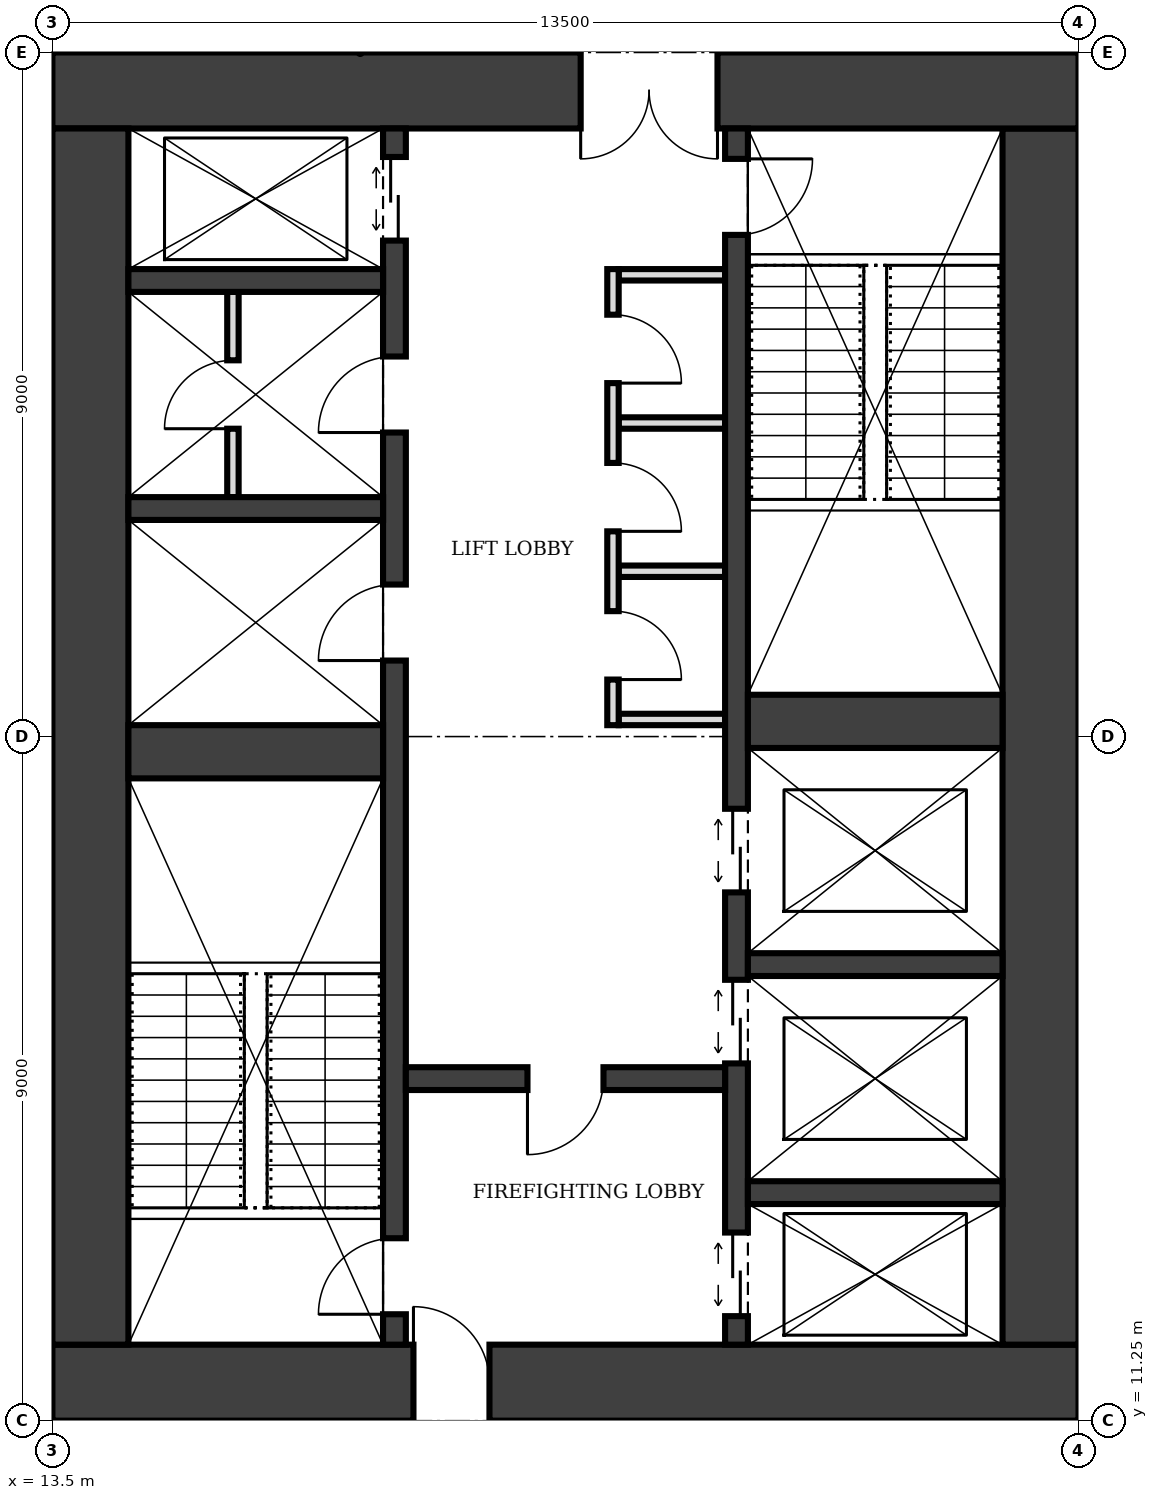
"""IFC4 building model, lengths in metres.
Left out: names, types, materials, properties, quantities, classifications, styles, units other than length and angle.
Written with IfcOpenShell. Run it as: python <this file> out.ifc"""

import sys

from ifc_helpers import new_model, si_unit, direction, frame, frame_2d, origin, place, context, subcontext, project, spatial, rectangle, extrude, element, fill, save


model = new_model("IFC4")
c1 = context("Model", 3, precision=1e-05, world=origin(), true_north=direction((0.0, 1.0)))
c2 = subcontext(c1, "Body", "Model", "MODEL_VIEW")
j1 = project(units=[si_unit("LENGTHUNIT", "METRE"), si_unit("PLANEANGLEUNIT", "RADIAN")], contexts=[c1])
p1 = place(None, origin())
s1 = spatial("IfcSite", under=j1, at=p1, CompositionType="ELEMENT")
p2 = place(p1, origin())
s2 = spatial("IfcBuilding", under=s1, at=p2, CompositionType="ELEMENT")
p3 = place(p2, frame((0.0, 0.0, 293.0)))
s3 = spatial("IfcBuildingStorey", under=s2, at=p3, CompositionType="ELEMENT", Elevation=293.0)
p4 = place(p3, frame((13.5, 11.75, 0.0), z_axis=(0.0, 0.0, 1.0), x_axis=(1.0, 0.0, 0.0)))
e1 = element("IfcWall", 1, at=p4, inside=s3, PredefinedType="SHEAR", context=c2, shape_type="SweptSolid", body=[
    extrude(rectangle(XDim=13.5, YDim=1.0, at=frame_2d((6.75, 0.0))), origin(), (0.0, 0.0, 1.0), 4.0),
])
p5 = place(p4, frame((4.75, 0.0, 0.0)))
e2 = element("IfcOpeningElement", 2, at=p5, cuts=e1, PredefinedType="OPENING", context=c2, shape_type="SweptSolid", body=[
    extrude(rectangle(XDim=1.0, YDim=2.1, at=frame_2d((0.5, 1.05))), frame((0.0, 0.51, 0.0), z_axis=(0.0, -1.0, 0.0), x_axis=(1.0, 0.0, 0.0)), (0.0, 0.0, 1.0), 1.02),
])
p6 = place(p3, frame((26.5, 12.25, 0.0), z_axis=(0.0, 0.0, 1.0), x_axis=(0.0, 1.0, 0.0)))
e3 = element("IfcWall", 3, at=p6, inside=s3, PredefinedType="SHEAR", context=c2, shape_type="SweptSolid", body=[
    extrude(rectangle(XDim=16.0, YDim=1.0, at=frame_2d((8.0, 0.0))), origin(), (0.0, 0.0, 1.0), 4.0),
])
p7 = place(p3, frame((27.0, 28.75, 0.0), z_axis=(0.0, 0.0, 1.0), x_axis=(-1.0, 0.0, 0.0)))
e4 = element("IfcWall", 4, at=p7, inside=s3, PredefinedType="SHEAR", context=c2, shape_type="SweptSolid", body=[
    extrude(rectangle(XDim=13.5, YDim=1.0, at=frame_2d((6.75, 0.0))), origin(), (0.0, 0.0, 1.0), 4.0),
])
p8 = place(p7, frame((4.75, 0.0, 0.0)))
e5 = element("IfcOpeningElement", 5, at=p8, cuts=e4, PredefinedType="OPENING", context=c2, shape_type="SweptSolid", body=[
    extrude(rectangle(XDim=1.8, YDim=2.1, at=frame_2d((0.9, 1.05))), frame((0.0, 0.51, 0.0), z_axis=(0.0, -1.0, 0.0), x_axis=(1.0, 0.0, 0.0)), (0.0, 0.0, 1.0), 1.02),
])
p9 = place(p3, frame((14.0, 28.25, 0.0), z_axis=(0.0, 0.0, 1.0), x_axis=(0.0, -1.0, 0.0)))
e6 = element("IfcWall", 6, at=p9, inside=s3, PredefinedType="SHEAR", context=c2, shape_type="SweptSolid", body=[
    extrude(rectangle(XDim=16.0, YDim=1.0, at=frame_2d((8.0, 0.0))), origin(), (0.0, 0.0, 1.0), 4.0),
])
p10 = place(p3, frame((18.0, 12.25, 0.0), z_axis=(0.0, 0.0, 1.0), x_axis=(0.0, 1.0, 0.0)))
e7 = element("IfcWall", 7, at=p10, inside=s3, PredefinedType="SHEAR", context=c2, shape_type="SweptSolid", body=[
    extrude(rectangle(XDim=16.0, YDim=0.3, at=frame_2d((8.0, 0.0))), origin(), (0.0, 0.0, 1.0), 4.0),
])
p11 = place(p10, frame((0.4, 0.0, 0.0)))
e8 = element("IfcOpeningElement", 8, at=p11, cuts=e7, PredefinedType="OPENING", context=c2, shape_type="SweptSolid", body=[
    extrude(rectangle(XDim=1.0, YDim=2.1, at=frame_2d((0.5, 1.05))), frame((0.0, 0.16, 0.0), z_axis=(0.0, -1.0, 0.0), x_axis=(1.0, 0.0, 0.0)), (0.0, 0.0, 1.0), 0.32),
])
p12 = place(p10, frame((14.525, 0.0, 0.0)))
e9 = element("IfcOpeningElement", 9, at=p12, cuts=e7, PredefinedType="OPENING", context=c2, shape_type="SweptSolid", body=[
    extrude(rectangle(XDim=1.1, YDim=2.1, at=frame_2d((0.55, 1.05))), frame((0.0, 0.16, 0.0), z_axis=(0.0, -1.0, 0.0), x_axis=(1.0, 0.0, 0.0)), (0.0, 0.0, 1.0), 0.32),
])
p13 = place(p10, frame((9.0, 0.0, 0.0)))
e10 = element("IfcOpeningElement", 10, at=p13, cuts=e7, PredefinedType="OPENING", context=c2, shape_type="SweptSolid", body=[
    extrude(rectangle(XDim=1.0, YDim=2.1, at=frame_2d((0.5, 1.05))), frame((0.0, 0.16, 0.0), z_axis=(0.0, -1.0, 0.0), x_axis=(1.0, 0.0, 0.0)), (0.0, 0.0, 1.0), 0.32),
])
p14 = place(p10, frame((12.0, 0.0, 0.0)))
e11 = element("IfcOpeningElement", 11, at=p14, cuts=e7, PredefinedType="OPENING", context=c2, shape_type="SweptSolid", body=[
    extrude(rectangle(XDim=1.0, YDim=2.1, at=frame_2d((0.5, 1.05))), frame((0.0, 0.16, 0.0), z_axis=(0.0, -1.0, 0.0), x_axis=(1.0, 0.0, 0.0)), (0.0, 0.0, 1.0), 0.32),
])
p15 = place(p3, frame((22.5, 12.25, 0.0), z_axis=(0.0, 0.0, 1.0), x_axis=(0.0, 1.0, 0.0)))
e12 = element("IfcWall", 12, at=p15, inside=s3, PredefinedType="SHEAR", context=c2, shape_type="SweptSolid", body=[
    extrude(rectangle(XDim=16.0, YDim=0.3, at=frame_2d((8.0, 0.0))), origin(), (0.0, 0.0, 1.0), 4.0),
])
p16 = place(p15, frame((14.6, 0.0, 0.0)))
e13 = element("IfcOpeningElement", 13, at=p16, cuts=e12, PredefinedType="OPENING", context=c2, shape_type="SweptSolid", body=[
    extrude(rectangle(XDim=1.0, YDim=2.1, at=frame_2d((0.5, 1.05))), frame((0.0, 0.16, 0.0), z_axis=(0.0, -1.0, 0.0), x_axis=(1.0, 0.0, 0.0)), (0.0, 0.0, 1.0), 0.32),
])
p17 = place(p15, frame((0.375, 0.0, 0.0)))
e14 = element("IfcOpeningElement", 14, at=p17, cuts=e12, PredefinedType="OPENING", context=c2, shape_type="SweptSolid", body=[
    extrude(rectangle(XDim=1.1, YDim=2.1, at=frame_2d((0.55, 1.05))), frame((0.0, 0.16, 0.0), z_axis=(0.0, -1.0, 0.0), x_axis=(1.0, 0.0, 0.0)), (0.0, 0.0, 1.0), 0.32),
])
p18 = place(p15, frame((3.7, 0.0, 0.0)))
e15 = element("IfcOpeningElement", 15, at=p18, cuts=e12, PredefinedType="OPENING", context=c2, shape_type="SweptSolid", body=[
    extrude(rectangle(XDim=1.1, YDim=2.1, at=frame_2d((0.55, 1.05))), frame((0.0, 0.16, 0.0), z_axis=(0.0, -1.0, 0.0), x_axis=(1.0, 0.0, 0.0)), (0.0, 0.0, 1.0), 0.32),
])
p19 = place(p15, frame((5.95, 0.0, 0.0)))
e16 = element("IfcOpeningElement", 16, at=p19, cuts=e12, PredefinedType="OPENING", context=c2, shape_type="SweptSolid", body=[
    extrude(rectangle(XDim=1.1, YDim=2.1, at=frame_2d((0.55, 1.05))), frame((0.0, 0.16, 0.0), z_axis=(0.0, -1.0, 0.0), x_axis=(1.0, 0.0, 0.0)), (0.0, 0.0, 1.0), 0.32),
])
p20 = place(p3, frame((14.5, 20.05, 0.0), z_axis=(0.0, 0.0, 1.0), x_axis=(1.0, 0.0, 0.0)))
e17 = element("IfcWall", 17, at=p20, inside=s3, PredefinedType="SHEAR", context=c2, shape_type="SweptSolid", body=[
    extrude(rectangle(XDim=3.35, YDim=0.7, at=frame_2d((1.675, 0.0))), origin(), (0.0, 0.0, 1.0), 4.0),
])
p21 = place(p3, frame((18.15, 15.75, 0.0), z_axis=(0.0, 0.0, 1.0), x_axis=(1.0, 0.0, 0.0)))
e18 = element("IfcWall", 18, at=p21, inside=s3, PredefinedType="SHEAR", context=c2, shape_type="SweptSolid", body=[
    extrude(rectangle(XDim=4.2, YDim=0.3, at=frame_2d((2.1, 0.0))), origin(), (0.0, 0.0, 1.0), 4.0),
])
p22 = place(p21, frame((1.6, 0.0, 0.0)))
e19 = element("IfcOpeningElement", 19, at=p22, cuts=e18, PredefinedType="OPENING", context=c2, shape_type="SweptSolid", body=[
    extrude(rectangle(XDim=1.0, YDim=2.1, at=frame_2d((0.5, 1.05))), frame((0.0, 0.16, 0.0), z_axis=(0.0, -1.0, 0.0), x_axis=(1.0, 0.0, 0.0)), (0.0, 0.0, 1.0), 0.32),
])
for number, where, z_axis, x_axis in (
    (20, (22.65, 14.25, 0.0), (0.0, 0.0, 1.0), (1.0, 0.0, 0.0)),
    (21, (22.65, 17.25, 0.0), (0.0, 0.0, 1.0), (1.0, 0.0, 0.0)),
):
    element("IfcWall", number, at=place(p3, frame(where, z_axis=z_axis, x_axis=x_axis)), inside=s3, PredefinedType="SHEAR", context=c2, shape_type="SweptSolid", body=[
        extrude(rectangle(XDim=3.35, YDim=0.3, at=frame_2d((1.675, 0.0))), origin(), (0.0, 0.0, 1.0), 4.0),
    ])
p23 = place(p3, frame((22.65, 20.45, 0.0), z_axis=(0.0, 0.0, 1.0), x_axis=(1.0, 0.0, 0.0)))
e22 = element("IfcWall", 22, at=p23, inside=s3, PredefinedType="SHEAR", context=c2, shape_type="SweptSolid", body=[
    extrude(rectangle(XDim=3.35, YDim=0.7, at=frame_2d((1.675, 0.0))), origin(), (0.0, 0.0, 1.0), 4.0),
])
for number, where, z_axis, x_axis in (
    (23, (14.5, 23.25, 0.0), (0.0, 0.0, 1.0), (1.0, 0.0, 0.0)),
    (24, (14.5, 26.25, 0.0), (0.0, 0.0, 1.0), (1.0, 0.0, 0.0)),
):
    element("IfcWall", number, at=place(p3, frame(where, z_axis=z_axis, x_axis=x_axis)), inside=s3, PredefinedType="SHEAR", context=c2, shape_type="SweptSolid", body=[
        extrude(rectangle(XDim=3.35, YDim=0.3, at=frame_2d((1.675, 0.0))), origin(), (0.0, 0.0, 1.0), 4.0),
    ])
p24 = place(p3, frame((20.875, 20.4, 0.0), z_axis=(0.0, 0.0, 1.0), x_axis=(0.0, 1.0, 0.0)))
e25 = element("IfcWall", 25, at=p24, inside=s3, PredefinedType="PARTITIONING", context=c2, shape_type="SweptSolid", body=[
    extrude(rectangle(XDim=6.0, YDim=0.15, at=frame_2d((3.0, 0.0))), origin(), (0.0, 0.0, 1.0), 3.75),
])
p25 = place(p24, frame((0.6, 0.0, 0.0)))
e26 = element("IfcOpeningElement", 26, at=p25, cuts=e25, PredefinedType="OPENING", context=c2, shape_type="SweptSolid", body=[
    extrude(rectangle(XDim=0.9, YDim=2.1, at=frame_2d((0.45, 1.05))), frame((0.0, 0.085, 0.0), z_axis=(0.0, -1.0, 0.0), x_axis=(1.0, 0.0, 0.0)), (0.0, 0.0, 1.0), 0.17),
])
p26 = place(p24, frame((2.55, 0.0, 0.0)))
e27 = element("IfcOpeningElement", 27, at=p26, cuts=e25, PredefinedType="OPENING", context=c2, shape_type="SweptSolid", body=[
    extrude(rectangle(XDim=0.9, YDim=2.1, at=frame_2d((0.45, 1.05))), frame((0.0, 0.085, 0.0), z_axis=(0.0, -1.0, 0.0), x_axis=(1.0, 0.0, 0.0)), (0.0, 0.0, 1.0), 0.17),
])
p27 = place(p24, frame((4.5, 0.0, 0.0)))
e28 = element("IfcOpeningElement", 28, at=p27, cuts=e25, PredefinedType="OPENING", context=c2, shape_type="SweptSolid", body=[
    extrude(rectangle(XDim=0.9, YDim=2.1, at=frame_2d((0.45, 1.05))), frame((0.0, 0.085, 0.0), z_axis=(0.0, -1.0, 0.0), x_axis=(1.0, 0.0, 0.0)), (0.0, 0.0, 1.0), 0.17),
])
for number, where, z_axis, x_axis in (
    (29, (20.95, 20.475, 0.0), (0.0, 0.0, 1.0), (1.0, 0.0, 0.0)),
    (30, (20.95, 22.425, 0.0), (0.0, 0.0, 1.0), (1.0, 0.0, 0.0)),
    (31, (20.95, 24.375, 0.0), (0.0, 0.0, 1.0), (1.0, 0.0, 0.0)),
    (32, (20.95, 26.325, 0.0), (0.0, 0.0, 1.0), (1.0, 0.0, 0.0)),
):
    element("IfcWall", number, at=place(p3, frame(where, z_axis=z_axis, x_axis=x_axis)), inside=s3, PredefinedType="PARTITIONING", context=c2, shape_type="SweptSolid", body=[
        extrude(rectangle(XDim=1.4, YDim=0.15, at=frame_2d((0.7, 0.0))), origin(), (0.0, 0.0, 1.0), 3.75),
    ])
p28 = place(p3, frame((15.875, 23.4, 0.0), z_axis=(0.0, 0.0, 1.0), x_axis=(0.0, 1.0, 0.0)))
e33 = element("IfcWall", 33, at=p28, inside=s3, PredefinedType="PARTITIONING", context=c2, shape_type="SweptSolid", body=[
    extrude(rectangle(XDim=2.7, YDim=0.15, at=frame_2d((1.35, 0.0))), origin(), (0.0, 0.0, 1.0), 3.75),
])
p29 = place(p28, frame((0.9, 0.0, 0.0)))
e34 = element("IfcOpeningElement", 34, at=p29, cuts=e33, PredefinedType="OPENING", context=c2, shape_type="SweptSolid", body=[
    extrude(rectangle(XDim=0.9, YDim=2.1, at=frame_2d((0.45, 1.05))), frame((0.0, 0.085, 0.0), z_axis=(0.0, -1.0, 0.0), x_axis=(1.0, 0.0, 0.0)), (0.0, 0.0, 1.0), 0.17),
])
p30 = place(p5, origin())
e35 = element("IfcDoor", 35, at=p30, inside=s3, OperationType="SINGLE_SWING_LEFT", PredefinedType="DOOR", context=c2, shape_type="SweptSolid", body=[
    extrude(rectangle(XDim=1.0, YDim=2.1, at=frame_2d((0.5, 1.05))), frame((0.0, 0.025, 0.0), z_axis=(0.0, -1.0, 0.0), x_axis=(1.0, 0.0, 0.0)), (0.0, 0.0, 1.0), 0.05),
])
fill(e2, e35)
p31 = place(p8, origin())
e36 = element("IfcDoor", 36, at=p31, inside=s3, OperationType="DOUBLE_DOOR_SINGLE_SWING", PredefinedType="DOOR", context=c2, shape_type="SweptSolid", body=[
    extrude(rectangle(XDim=1.8, YDim=2.1, at=frame_2d((0.9, 1.05))), frame((0.0, 0.025, 0.0), z_axis=(0.0, -1.0, 0.0), x_axis=(1.0, 0.0, 0.0)), (0.0, 0.0, 1.0), 0.05),
])
fill(e5, e36)
p32 = place(p22, frame((1.0, 0.0, 0.0), z_axis=(0.0, 0.0, 1.0), x_axis=(-1.0, 0.0, 0.0)))
e37 = element("IfcDoor", 37, at=p32, inside=s3, OperationType="SINGLE_SWING_RIGHT", PredefinedType="DOOR", context=c2, shape_type="SweptSolid", body=[
    extrude(rectangle(XDim=1.0, YDim=2.1, at=frame_2d((0.5, 1.05))), frame((0.0, 0.025, 0.0), z_axis=(0.0, -1.0, 0.0), x_axis=(1.0, 0.0, 0.0)), (0.0, 0.0, 1.0), 0.05),
])
fill(e19, e37)
p33 = place(p11, origin())
e38 = element("IfcDoor", 38, at=p33, inside=s3, OperationType="SINGLE_SWING_LEFT", PredefinedType="DOOR", context=c2, shape_type="SweptSolid", body=[
    extrude(rectangle(XDim=1.0, YDim=2.1, at=frame_2d((0.5, 1.05))), frame((0.0, 0.025, 0.0), z_axis=(0.0, -1.0, 0.0), x_axis=(1.0, 0.0, 0.0)), (0.0, 0.0, 1.0), 0.05),
])
fill(e8, e38)
p34 = place(p16, frame((1.0, 0.0, 0.0), z_axis=(0.0, 0.0, 1.0), x_axis=(-1.0, 0.0, 0.0)))
e39 = element("IfcDoor", 39, at=p34, inside=s3, OperationType="SINGLE_SWING_LEFT", PredefinedType="DOOR", context=c2, shape_type="SweptSolid", body=[
    extrude(rectangle(XDim=1.0, YDim=2.1, at=frame_2d((0.5, 1.05))), frame((0.0, 0.025, 0.0), z_axis=(0.0, -1.0, 0.0), x_axis=(1.0, 0.0, 0.0)), (0.0, 0.0, 1.0), 0.05),
])
fill(e13, e39)
p35 = place(p17, origin())
e40 = element("IfcDoor", 40, at=p35, inside=s3, OperationType="DOUBLE_DOOR_SLIDING", PredefinedType="DOOR", context=c2, shape_type="SweptSolid", body=[
    extrude(rectangle(XDim=1.1, YDim=2.1, at=frame_2d((0.55, 1.05))), frame((0.0, 0.025, 0.0), z_axis=(0.0, -1.0, 0.0), x_axis=(1.0, 0.0, 0.0)), (0.0, 0.0, 1.0), 0.05),
])
fill(e14, e40)
p36 = place(p12, origin())
e41 = element("IfcDoor", 41, at=p36, inside=s3, OperationType="DOUBLE_DOOR_SLIDING", PredefinedType="DOOR", context=c2, shape_type="SweptSolid", body=[
    extrude(rectangle(XDim=1.1, YDim=2.1, at=frame_2d((0.55, 1.05))), frame((0.0, 0.025, 0.0), z_axis=(0.0, -1.0, 0.0), x_axis=(1.0, 0.0, 0.0)), (0.0, 0.0, 1.0), 0.05),
])
fill(e9, e41)
p37 = place(p18, origin())
e42 = element("IfcDoor", 42, at=p37, inside=s3, OperationType="DOUBLE_DOOR_SLIDING", PredefinedType="DOOR", context=c2, shape_type="SweptSolid", body=[
    extrude(rectangle(XDim=1.1, YDim=2.1, at=frame_2d((0.55, 1.05))), frame((0.0, 0.025, 0.0), z_axis=(0.0, -1.0, 0.0), x_axis=(1.0, 0.0, 0.0)), (0.0, 0.0, 1.0), 0.05),
])
fill(e15, e42)
p38 = place(p19, origin())
e43 = element("IfcDoor", 43, at=p38, inside=s3, OperationType="DOUBLE_DOOR_SLIDING", PredefinedType="DOOR", context=c2, shape_type="SweptSolid", body=[
    extrude(rectangle(XDim=1.1, YDim=2.1, at=frame_2d((0.55, 1.05))), frame((0.0, 0.025, 0.0), z_axis=(0.0, -1.0, 0.0), x_axis=(1.0, 0.0, 0.0)), (0.0, 0.0, 1.0), 0.05),
])
fill(e16, e43)
p39 = place(p25, frame((0.9, 0.0, 0.0), z_axis=(0.0, 0.0, 1.0), x_axis=(-1.0, 0.0, 0.0)))
e44 = element("IfcDoor", 44, at=p39, inside=s3, OperationType="SINGLE_SWING_RIGHT", PredefinedType="DOOR", context=c2, shape_type="SweptSolid", body=[
    extrude(rectangle(XDim=0.9, YDim=2.1, at=frame_2d((0.45, 1.05))), frame((0.0, 0.025, 0.0), z_axis=(0.0, -1.0, 0.0), x_axis=(1.0, 0.0, 0.0)), (0.0, 0.0, 1.0), 0.05),
])
fill(e26, e44)
p40 = place(p26, frame((0.9, 0.0, 0.0), z_axis=(0.0, 0.0, 1.0), x_axis=(-1.0, 0.0, 0.0)))
e45 = element("IfcDoor", 45, at=p40, inside=s3, OperationType="SINGLE_SWING_RIGHT", PredefinedType="DOOR", context=c2, shape_type="SweptSolid", body=[
    extrude(rectangle(XDim=0.9, YDim=2.1, at=frame_2d((0.45, 1.05))), frame((0.0, 0.025, 0.0), z_axis=(0.0, -1.0, 0.0), x_axis=(1.0, 0.0, 0.0)), (0.0, 0.0, 1.0), 0.05),
])
fill(e27, e45)
p41 = place(p27, frame((0.9, 0.0, 0.0), z_axis=(0.0, 0.0, 1.0), x_axis=(-1.0, 0.0, 0.0)))
e46 = element("IfcDoor", 46, at=p41, inside=s3, OperationType="SINGLE_SWING_RIGHT", PredefinedType="DOOR", context=c2, shape_type="SweptSolid", body=[
    extrude(rectangle(XDim=0.9, YDim=2.1, at=frame_2d((0.45, 1.05))), frame((0.0, 0.025, 0.0), z_axis=(0.0, -1.0, 0.0), x_axis=(1.0, 0.0, 0.0)), (0.0, 0.0, 1.0), 0.05),
])
fill(e28, e46)
p42 = place(p13, origin())
e47 = element("IfcDoor", 47, at=p42, inside=s3, OperationType="SINGLE_SWING_LEFT", PredefinedType="DOOR", context=c2, shape_type="SweptSolid", body=[
    extrude(rectangle(XDim=1.0, YDim=2.1, at=frame_2d((0.5, 1.05))), frame((0.0, 0.025, 0.0), z_axis=(0.0, -1.0, 0.0), x_axis=(1.0, 0.0, 0.0)), (0.0, 0.0, 1.0), 0.05),
])
fill(e10, e47)
p43 = place(p14, origin())
e48 = element("IfcDoor", 48, at=p43, inside=s3, OperationType="SINGLE_SWING_LEFT", PredefinedType="DOOR", context=c2, shape_type="SweptSolid", body=[
    extrude(rectangle(XDim=1.0, YDim=2.1, at=frame_2d((0.5, 1.05))), frame((0.0, 0.025, 0.0), z_axis=(0.0, -1.0, 0.0), x_axis=(1.0, 0.0, 0.0)), (0.0, 0.0, 1.0), 0.05),
])
fill(e11, e48)
p44 = place(p29, origin())
e49 = element("IfcDoor", 49, at=p44, inside=s3, OperationType="SINGLE_SWING_LEFT", PredefinedType="DOOR", context=c2, shape_type="SweptSolid", body=[
    extrude(rectangle(XDim=0.9, YDim=2.1, at=frame_2d((0.45, 1.05))), frame((0.0, 0.025, 0.0), z_axis=(0.0, -1.0, 0.0), x_axis=(1.0, 0.0, 0.0)), (0.0, 0.0, 1.0), 0.05),
])
fill(e34, e49)
save(model, sys.argv[1])
